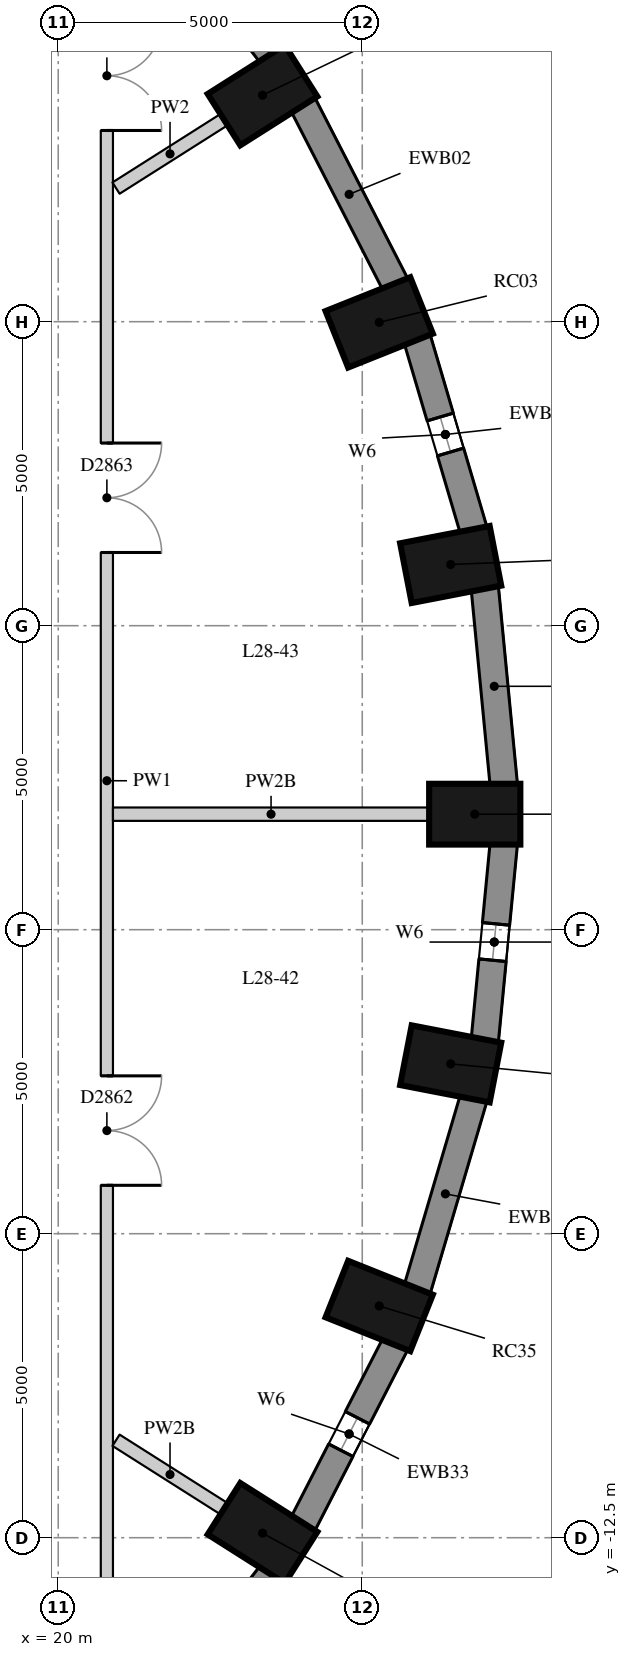
"""IFC4 building model, lengths in metres.
Left out: names, types, materials, properties, quantities, classifications, styles, units other than length and angle.
Written with IfcOpenShell. Run it as: python <this file> out.ifc"""

import sys

from ifc_helpers import new_model, si_unit, direction, frame, frame_2d, origin, origin_2d, place, context, subcontext, project, spatial, rectangle, extrude, element, fill, save


model = new_model("IFC4")
c1 = context("Model", 3, precision=1e-05, world=origin(), true_north=direction((0.0, 1.0)))
c2 = subcontext(c1, "Body", "Model", "MODEL_VIEW")
j1 = project(units=[si_unit("LENGTHUNIT", "METRE"), si_unit("PLANEANGLEUNIT", "RADIAN")], contexts=[c1])
p1 = place(None, origin())
s1 = spatial("IfcSite", under=j1, at=p1, CompositionType="ELEMENT")
p2 = place(p1, origin())
s2 = spatial("IfcBuilding", under=s1, at=p2, CompositionType="ELEMENT")
p3 = place(p2, frame((0.0, 0.0, 102.1)))
s3 = spatial("IfcBuildingStorey", under=s2, at=p3, CompositionType="ELEMENT", Elevation=102.1)
for number, where, z_axis, x_axis in (
    (1, (26.85, -0.6, 0.0), (0.0, 0.0, 1.0), (1.0, 0.0, 0.0)),
    (2, (26.454, 3.507, 0.0), (0.0, 0.0, 1.0), (0.982, 0.19, 0.0)),
    (3, (25.279, 7.489, 0.0), (0.0, 0.0, 1.0), (0.929, 0.371, 0.0)),
    (4, (23.36, 11.225, 0.0), (0.0, 0.0, 1.0), (0.845, 0.536, 0.0)),
    (5, (23.36, -12.425, 0.0), (0.0, 0.0, 1.0), (0.845, -0.536, 0.0)),
    (6, (25.279, -8.689, 0.0), (0.0, 0.0, 1.0), (0.929, -0.371, 0.0)),
    (7, (26.454, -4.707, 0.0), (0.0, 0.0, 1.0), (0.982, -0.19, 0.0)),
):
    element("IfcColumn", number, at=place(p3, frame(where, z_axis=z_axis, x_axis=x_axis)), inside=s3, PredefinedType="COLUMN", context=c2, shape_type="SweptSolid", body=[
        extrude(rectangle(XDim=1.5, YDim=1.0, at=origin_2d()), origin(), (0.0, 0.0, 1.0), 3.3),
    ])
p4 = place(p3, frame((27.328, -0.12, 0.0), z_axis=(0.0, 0.0, 1.0), x_axis=(-0.09589355735, 0.995391594127, 0.0)))
e8 = element("IfcWall", 8, at=p4, inside=s3, PredefinedType="SOLIDWALL", context=c2, shape_type="SweptSolid", body=[
    extrude(rectangle(XDim=3.261, YDim=0.45, at=frame_2d((1.631, 0.0))), origin(), (0.0, 0.0, 1.0), 3.02),
])
p5 = place(p3, frame((26.832, 4.069, 0.0), z_axis=(0.0, 0.0, 1.0), x_axis=(-0.283002902729, 0.959119052593, 0.0)))
e9 = element("IfcWall", 9, at=p5, inside=s3, PredefinedType="SOLIDWALL", context=c2, shape_type="SweptSolid", body=[
    extrude(rectangle(XDim=3.286, YDim=0.45, at=frame_2d((1.643, 0.0))), origin(), (0.0, 0.0, 1.0), 3.02),
])
p6 = place(p5, frame((1.343, 0.0, 0.4)))
e10 = element("IfcOpeningElement", 10, at=p6, cuts=e9, PredefinedType="OPENING", context=c2, shape_type="SweptSolid", body=[
    extrude(rectangle(XDim=0.6, YDim=1.75, at=frame_2d((0.3, 0.875))), frame((0.0, 0.235, 0.0), z_axis=(0.0, -1.0, 0.0), x_axis=(1.0, 0.0, 0.0)), (0.0, 0.0, 1.0), 0.47),
])
p7 = place(p3, frame((25.545, 8.112, 0.0), z_axis=(0.0, 0.0, 1.0), x_axis=(-0.456828186229, 0.889554949549, 0.0)))
e11 = element("IfcWall", 11, at=p7, inside=s3, PredefinedType="SOLIDWALL", context=c2, shape_type="SweptSolid", body=[
    extrude(rectangle(XDim=3.333, YDim=0.45, at=frame_2d((1.667, 0.0))), origin(), (0.0, 0.0, 1.0), 3.02),
])
p8 = place(p3, frame((23.508, 11.887, 0.0), z_axis=(0.0, 0.0, 1.0), x_axis=(-0.610693945156, 0.791866721961, 0.0)))
e12 = element("IfcWall", 12, at=p8, inside=s3, PredefinedType="SOLIDWALL", context=c2, shape_type="SweptSolid", body=[
    extrude(rectangle(XDim=3.395, YDim=0.45, at=frame_2d((1.697, 0.0))), origin(), (0.0, 0.0, 1.0), 3.02),
])
p9 = place(p8, frame((1.397, 0.0, 0.4)))
e13 = element("IfcOpeningElement", 13, at=p9, cuts=e12, PredefinedType="OPENING", context=c2, shape_type="SweptSolid", body=[
    extrude(rectangle(XDim=0.6, YDim=1.75, at=frame_2d((0.3, 0.875))), frame((0.0, 0.235, 0.0), z_axis=(0.0, -1.0, 0.0), x_axis=(1.0, 0.0, 0.0)), (0.0, 0.0, 1.0), 0.47),
])
p10 = place(p3, frame((21.435, -15.775, 0.0), z_axis=(0.0, 0.0, 1.0), x_axis=(0.610693945156, 0.791866721961, 0.0)))
e14 = element("IfcWall", 14, at=p10, inside=s3, PredefinedType="SOLIDWALL", context=c2, shape_type="SweptSolid", body=[
    extrude(rectangle(XDim=3.395, YDim=0.45, at=frame_2d((1.697, 0.0))), origin(), (0.0, 0.0, 1.0), 3.02),
])
p11 = place(p3, frame((24.023, -12.277, 0.0), z_axis=(0.0, 0.0, 1.0), x_axis=(0.456828186229, 0.889554949549, 0.0)))
e15 = element("IfcWall", 15, at=p11, inside=s3, PredefinedType="SOLIDWALL", context=c2, shape_type="SweptSolid", body=[
    extrude(rectangle(XDim=3.333, YDim=0.45, at=frame_2d((1.667, 0.0))), origin(), (0.0, 0.0, 1.0), 3.02),
])
p12 = place(p11, frame((1.366, 0.0, 0.4)))
e16 = element("IfcOpeningElement", 16, at=p12, cuts=e15, PredefinedType="OPENING", context=c2, shape_type="SweptSolid", body=[
    extrude(rectangle(XDim=0.6, YDim=1.75, at=frame_2d((0.3, 0.875))), frame((0.0, 0.235, 0.0), z_axis=(0.0, -1.0, 0.0), x_axis=(1.0, 0.0, 0.0)), (0.0, 0.0, 1.0), 0.47),
])
p13 = place(p3, frame((25.902, -8.421, 0.0), z_axis=(0.0, 0.0, 1.0), x_axis=(0.282982737009, 0.95912500257, 0.0)))
e17 = element("IfcWall", 17, at=p13, inside=s3, PredefinedType="SOLIDWALL", context=c2, shape_type="SweptSolid", body=[
    extrude(rectangle(XDim=3.286, YDim=0.45, at=frame_2d((1.643, 0.0))), origin(), (0.0, 0.0, 1.0), 3.02),
])
p14 = place(p3, frame((27.015, -4.326, 0.0), z_axis=(0.0, 0.0, 1.0), x_axis=(0.09589355735, 0.995391594127, 0.0)))
e18 = element("IfcWall", 18, at=p14, inside=s3, PredefinedType="SOLIDWALL", context=c2, shape_type="SweptSolid", body=[
    extrude(rectangle(XDim=3.261, YDim=0.45, at=frame_2d((1.631, 0.0))), origin(), (0.0, 0.0, 1.0), 3.02),
])
p15 = place(p14, frame((1.331, 0.0, 0.4)))
e19 = element("IfcOpeningElement", 19, at=p15, cuts=e18, PredefinedType="OPENING", context=c2, shape_type="SweptSolid", body=[
    extrude(rectangle(XDim=0.6, YDim=1.75, at=frame_2d((0.3, 0.875))), frame((0.0, 0.235, 0.0), z_axis=(0.0, -1.0, 0.0), x_axis=(1.0, 0.0, 0.0)), (0.0, 0.0, 1.0), 0.47),
])
p16 = place(p3, frame((20.8, 13.5, 0.0), z_axis=(0.0, 0.0, 1.0), x_axis=(0.0, -1.0, 0.0)))
e20 = element("IfcWall", 20, at=p16, inside=s3, PredefinedType="PARTITIONING", context=c2, shape_type="SweptSolid", body=[
    extrude(rectangle(XDim=27.1, YDim=0.2, at=frame_2d((13.55, 0.0))), origin(), (0.0, 0.0, 1.0), 3.02),
])
p17 = place(p16, frame((18.404, 0.0, 0.0)))
e21 = element("IfcOpeningElement", 21, at=p17, cuts=e20, PredefinedType="OPENING", context=c2, shape_type="SweptSolid", body=[
    extrude(rectangle(XDim=1.8, YDim=2.1, at=frame_2d((0.9, 1.05))), frame((0.0, 0.11, 0.0), z_axis=(0.0, -1.0, 0.0), x_axis=(1.0, 0.0, 0.0)), (0.0, 0.0, 1.0), 0.22),
])
p18 = place(p16, frame((7.996, 0.0, 0.0)))
e22 = element("IfcOpeningElement", 22, at=p18, cuts=e20, PredefinedType="OPENING", context=c2, shape_type="SweptSolid", body=[
    extrude(rectangle(XDim=1.8, YDim=2.1, at=frame_2d((0.9, 1.05))), frame((0.0, 0.11, 0.0), z_axis=(0.0, -1.0, 0.0), x_axis=(1.0, 0.0, 0.0)), (0.0, 0.0, 1.0), 0.22),
])
p19 = place(p16, frame((1.055, 0.0, 0.0)))
e23 = element("IfcOpeningElement", 23, at=p19, cuts=e20, PredefinedType="OPENING", context=c2, shape_type="SweptSolid", body=[
    extrude(rectangle(XDim=1.8, YDim=2.1, at=frame_2d((0.9, 1.05))), frame((0.0, 0.11, 0.0), z_axis=(0.0, -1.0, 0.0), x_axis=(1.0, 0.0, 0.0)), (0.0, 0.0, 1.0), 0.22),
])
p20 = place(p3, frame((26.1, -0.6, 0.0), z_axis=(0.0, 0.0, 1.0), x_axis=(-1.0, 0.0, 0.0)))
e24 = element("IfcWall", 24, at=p20, inside=s3, PredefinedType="PARTITIONING", context=c2, shape_type="SweptSolid", body=[
    extrude(rectangle(XDim=5.2, YDim=0.22, at=frame_2d((2.6, 0.0))), origin(), (0.0, 0.0, 1.0), 2.57),
])
p21 = place(p3, frame((22.727, 10.823, 0.0), z_axis=(0.0, 0.0, 1.0), x_axis=(-0.844549560094, -0.53547739499, 0.0)))
e25 = element("IfcWall", 25, at=p21, inside=s3, PredefinedType="PARTITIONING", context=c2, shape_type="SweptSolid", body=[
    extrude(rectangle(XDim=2.103, YDim=0.22, at=frame_2d((1.051, 0.0))), origin(), (0.0, 0.0, 1.0), 3.02),
])
p22 = place(p3, frame((22.727, -12.023, 0.0), z_axis=(0.0, 0.0, 1.0), x_axis=(-0.844497052188, 0.535560200954, 0.0)))
e26 = element("IfcWall", 26, at=p22, inside=s3, PredefinedType="PARTITIONING", context=c2, shape_type="SweptSolid", body=[
    extrude(rectangle(XDim=2.103, YDim=0.22, at=frame_2d((1.051, 0.0))), origin(), (0.0, 0.0, 1.0), 2.57),
])
p23 = place(p6, origin())
e27 = element("IfcWindow", 27, at=p23, inside=s3, PartitioningType="SINGLE_PANEL", PredefinedType="WINDOW", context=c2, shape_type="SweptSolid", body=[
    extrude(rectangle(XDim=0.6, YDim=1.75, at=frame_2d((0.3, 0.875))), frame((0.0, 0.035, 0.0), z_axis=(0.0, -1.0, 0.0), x_axis=(1.0, 0.0, 0.0)), (0.0, 0.0, 1.0), 0.06),
])
fill(e10, e27)
p24 = place(p12, origin())
e28 = element("IfcWindow", 28, at=p24, inside=s3, PartitioningType="SINGLE_PANEL", PredefinedType="WINDOW", context=c2, shape_type="SweptSolid", body=[
    extrude(rectangle(XDim=0.6, YDim=1.75, at=frame_2d((0.3, 0.875))), frame((0.0, 0.035, 0.0), z_axis=(0.0, -1.0, 0.0), x_axis=(1.0, 0.0, 0.0)), (0.0, 0.0, 1.0), 0.06),
])
fill(e16, e28)
p25 = place(p15, origin())
e29 = element("IfcWindow", 29, at=p25, inside=s3, PartitioningType="SINGLE_PANEL", PredefinedType="WINDOW", context=c2, shape_type="SweptSolid", body=[
    extrude(rectangle(XDim=0.6, YDim=1.75, at=frame_2d((0.3, 0.875))), frame((0.0, 0.035, 0.0), z_axis=(0.0, -1.0, 0.0), x_axis=(1.0, 0.0, 0.0)), (0.0, 0.0, 1.0), 0.06),
])
fill(e19, e29)
p26 = place(p17, origin())
e30 = element("IfcDoor", 30, at=p26, inside=s3, OperationType="DOUBLE_DOOR_SINGLE_SWING", PredefinedType="DOOR", context=c2, shape_type="SweptSolid", body=[
    extrude(rectangle(XDim=1.8, YDim=2.1, at=frame_2d((0.9, 1.05))), frame((0.0, 0.025, 0.0), z_axis=(0.0, -1.0, 0.0), x_axis=(1.0, 0.0, 0.0)), (0.0, 0.0, 1.0), 0.05),
])
fill(e21, e30)
p27 = place(p18, origin())
e31 = element("IfcDoor", 31, at=p27, inside=s3, OperationType="DOUBLE_DOOR_SINGLE_SWING", PredefinedType="DOOR", context=c2, shape_type="SweptSolid", body=[
    extrude(rectangle(XDim=1.8, YDim=2.1, at=frame_2d((0.9, 1.05))), frame((0.0, 0.025, 0.0), z_axis=(0.0, -1.0, 0.0), x_axis=(1.0, 0.0, 0.0)), (0.0, 0.0, 1.0), 0.05),
])
fill(e22, e31)
p28 = place(p19, origin())
e32 = element("IfcDoor", 32, at=p28, inside=s3, OperationType="DOUBLE_DOOR_SINGLE_SWING", PredefinedType="DOOR", context=c2, shape_type="SweptSolid", body=[
    extrude(rectangle(XDim=1.8, YDim=2.1, at=frame_2d((0.9, 1.05))), frame((0.0, 0.025, 0.0), z_axis=(0.0, -1.0, 0.0), x_axis=(1.0, 0.0, 0.0)), (0.0, 0.0, 1.0), 0.05),
])
fill(e23, e32)
save(model, sys.argv[1])
